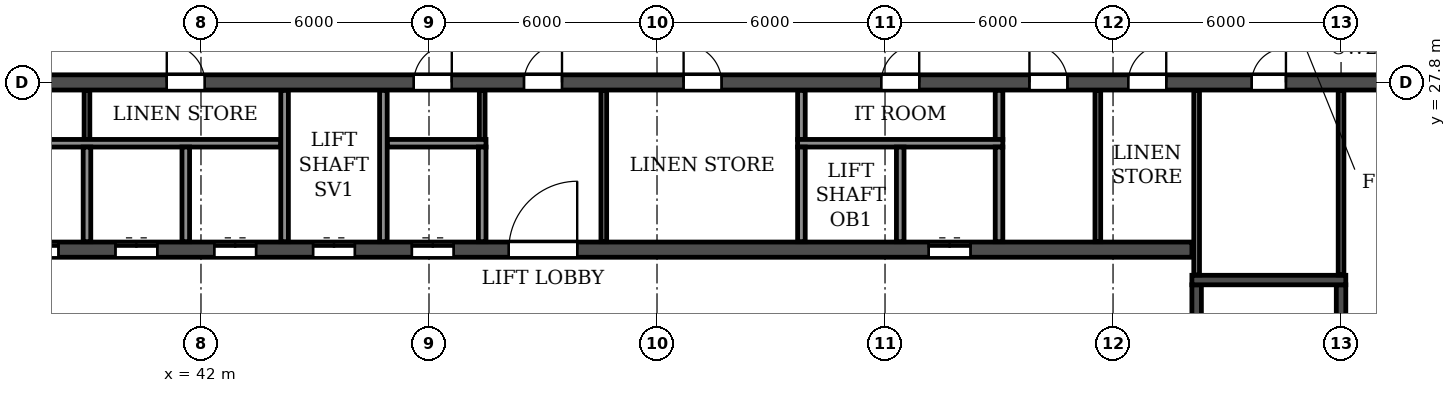
"""IFC4 building model, lengths in metres.
Left out: names, types, materials, properties, quantities, classifications, styles, units other than length and angle.
Written with IfcOpenShell. Run it as: python <this file> out.ifc"""

import sys

from ifc_helpers import new_model, si_unit, direction, frame, frame_2d, origin, place, context, subcontext, project, spatial, rectangle, extrude, element, fill, save


model = new_model("IFC4")
c1 = context("Model", 3, precision=1e-05, world=origin(), true_north=direction((0.0, 1.0)))
c2 = subcontext(c1, "Body", "Model", "MODEL_VIEW")
j1 = project(units=[si_unit("LENGTHUNIT", "METRE"), si_unit("PLANEANGLEUNIT", "RADIAN")], contexts=[c1])
p1 = place(None, origin())
s1 = spatial("IfcSite", under=j1, at=p1, CompositionType="ELEMENT")
p2 = place(p1, origin())
s2 = spatial("IfcBuilding", under=s1, at=p2, CompositionType="ELEMENT")
p3 = place(p2, frame((0.0, 0.0, 171.9)))
s3 = spatial("IfcBuildingStorey", under=s2, at=p3, CompositionType="ELEMENT", Elevation=171.9)
p4 = place(p3, frame((18.2, 27.8, 0.0), z_axis=(0.0, 0.0, 1.0), x_axis=(1.0, 0.0, 0.0)))
e1 = element("IfcWall", 1, at=p4, inside=s3, PredefinedType="SOLIDWALL", context=c2, shape_type="SweptSolid", body=[
    extrude(rectangle(XDim=65.6, YDim=0.4, at=frame_2d((32.8, 0.0))), origin(), (0.0, 0.0, 1.0), 3.08),
])
p5 = place(p4, frame((0.7, 0.0, 0.0)))
e2 = element("IfcOpeningElement", 2, at=p5, cuts=e1, PredefinedType="OPENING", context=c2, shape_type="SweptSolid", body=[
    extrude(rectangle(XDim=1.0, YDim=2.1, at=frame_2d((0.5, 1.05))), frame((0.0, 0.21, 0.0), z_axis=(0.0, -1.0, 0.0), x_axis=(1.0, 0.0, 0.0)), (0.0, 0.0, 1.0), 0.42),
])
p6 = place(p4, frame((4.05, 0.0, 0.0)))
e3 = element("IfcOpeningElement", 3, at=p6, cuts=e1, PredefinedType="OPENING", context=c2, shape_type="SweptSolid", body=[
    extrude(rectangle(XDim=0.9, YDim=2.1, at=frame_2d((0.45, 1.05))), frame((0.0, 0.21, 0.0), z_axis=(0.0, -1.0, 0.0), x_axis=(1.0, 0.0, 0.0)), (0.0, 0.0, 1.0), 0.42),
])
p7 = place(p4, frame((13.25, 0.0, 0.0)))
e4 = element("IfcOpeningElement", 4, at=p7, cuts=e1, PredefinedType="OPENING", context=c2, shape_type="SweptSolid", body=[
    extrude(rectangle(XDim=0.9, YDim=2.1, at=frame_2d((0.45, 1.05))), frame((0.0, 0.21, 0.0), z_axis=(0.0, -1.0, 0.0), x_axis=(1.0, 0.0, 0.0)), (0.0, 0.0, 1.0), 0.42),
])
p8 = place(p4, frame((17.7, 0.0, 0.0)))
e5 = element("IfcOpeningElement", 5, at=p8, cuts=e1, PredefinedType="OPENING", context=c2, shape_type="SweptSolid", body=[
    extrude(rectangle(XDim=1.0, YDim=2.1, at=frame_2d((0.5, 1.05))), frame((0.0, 0.21, 0.0), z_axis=(0.0, -1.0, 0.0), x_axis=(1.0, 0.0, 0.0)), (0.0, 0.0, 1.0), 0.42),
])
p9 = place(p4, frame((22.9, 0.0, 0.0)))
e6 = element("IfcOpeningElement", 6, at=p9, cuts=e1, PredefinedType="OPENING", context=c2, shape_type="SweptSolid", body=[
    extrude(rectangle(XDim=1.0, YDim=2.1, at=frame_2d((0.5, 1.05))), frame((0.0, 0.21, 0.0), z_axis=(0.0, -1.0, 0.0), x_axis=(1.0, 0.0, 0.0)), (0.0, 0.0, 1.0), 0.42),
])
p10 = place(p4, frame((29.4, 0.0, 0.0)))
e7 = element("IfcOpeningElement", 7, at=p10, cuts=e1, PredefinedType="OPENING", context=c2, shape_type="SweptSolid", body=[
    extrude(rectangle(XDim=1.0, YDim=2.1, at=frame_2d((0.5, 1.05))), frame((0.0, 0.21, 0.0), z_axis=(0.0, -1.0, 0.0), x_axis=(1.0, 0.0, 0.0)), (0.0, 0.0, 1.0), 0.42),
])
p11 = place(p4, frame((32.3, 0.0, 0.0)))
e8 = element("IfcOpeningElement", 8, at=p11, cuts=e1, PredefinedType="OPENING", context=c2, shape_type="SweptSolid", body=[
    extrude(rectangle(XDim=1.0, YDim=2.1, at=frame_2d((0.5, 1.05))), frame((0.0, 0.21, 0.0), z_axis=(0.0, -1.0, 0.0), x_axis=(1.0, 0.0, 0.0)), (0.0, 0.0, 1.0), 0.42),
])
p12 = place(p4, frame((36.5, 0.0, 0.0)))
e9 = element("IfcOpeningElement", 9, at=p12, cuts=e1, PredefinedType="OPENING", context=c2, shape_type="SweptSolid", body=[
    extrude(rectangle(XDim=1.0, YDim=2.1, at=frame_2d((0.5, 1.05))), frame((0.0, 0.21, 0.0), z_axis=(0.0, -1.0, 0.0), x_axis=(1.0, 0.0, 0.0)), (0.0, 0.0, 1.0), 0.42),
])
p13 = place(p4, frame((41.7, 0.0, 0.0)))
e10 = element("IfcOpeningElement", 10, at=p13, cuts=e1, PredefinedType="OPENING", context=c2, shape_type="SweptSolid", body=[
    extrude(rectangle(XDim=1.0, YDim=2.1, at=frame_2d((0.5, 1.05))), frame((0.0, 0.21, 0.0), z_axis=(0.0, -1.0, 0.0), x_axis=(1.0, 0.0, 0.0)), (0.0, 0.0, 1.0), 0.42),
])
p14 = place(p4, frame((45.6, 0.0, 0.0)))
e11 = element("IfcOpeningElement", 11, at=p14, cuts=e1, PredefinedType="OPENING", context=c2, shape_type="SweptSolid", body=[
    extrude(rectangle(XDim=1.0, YDim=2.1, at=frame_2d((0.5, 1.05))), frame((0.0, 0.21, 0.0), z_axis=(0.0, -1.0, 0.0), x_axis=(1.0, 0.0, 0.0)), (0.0, 0.0, 1.0), 0.42),
])
p15 = place(p4, frame((48.2, 0.0, 0.0)))
e12 = element("IfcOpeningElement", 12, at=p15, cuts=e1, PredefinedType="OPENING", context=c2, shape_type="SweptSolid", body=[
    extrude(rectangle(XDim=1.0, YDim=2.1, at=frame_2d((0.5, 1.05))), frame((0.0, 0.21, 0.0), z_axis=(0.0, -1.0, 0.0), x_axis=(1.0, 0.0, 0.0)), (0.0, 0.0, 1.0), 0.42),
])
p16 = place(p4, frame((51.45, 0.0, 0.0)))
e13 = element("IfcOpeningElement", 13, at=p16, cuts=e1, PredefinedType="OPENING", context=c2, shape_type="SweptSolid", body=[
    extrude(rectangle(XDim=0.9, YDim=2.1, at=frame_2d((0.45, 1.05))), frame((0.0, 0.21, 0.0), z_axis=(0.0, -1.0, 0.0), x_axis=(1.0, 0.0, 0.0)), (0.0, 0.0, 1.0), 0.42),
])
p17 = place(p4, frame((60.65, 0.0, 0.0)))
e14 = element("IfcOpeningElement", 14, at=p17, cuts=e1, PredefinedType="OPENING", context=c2, shape_type="SweptSolid", body=[
    extrude(rectangle(XDim=0.9, YDim=2.1, at=frame_2d((0.45, 1.05))), frame((0.0, 0.21, 0.0), z_axis=(0.0, -1.0, 0.0), x_axis=(1.0, 0.0, 0.0)), (0.0, 0.0, 1.0), 0.42),
])
p18 = place(p4, frame((63.9, 0.0, 0.0)))
e15 = element("IfcOpeningElement", 15, at=p18, cuts=e1, PredefinedType="OPENING", context=c2, shape_type="SweptSolid", body=[
    extrude(rectangle(XDim=1.0, YDim=2.1, at=frame_2d((0.5, 1.05))), frame((0.0, 0.21, 0.0), z_axis=(0.0, -1.0, 0.0), x_axis=(1.0, 0.0, 0.0)), (0.0, 0.0, 1.0), 0.42),
])
p19 = place(p3, frame((33.925, 23.4, 0.0), z_axis=(0.0, 0.0, 1.0), x_axis=(1.0, 0.0, 0.0)))
e16 = element("IfcWall", 16, at=p19, inside=s3, PredefinedType="SOLIDWALL", context=c2, shape_type="SweptSolid", body=[
    extrude(rectangle(XDim=34.15, YDim=0.4, at=frame_2d((17.075, 0.0))), origin(), (0.0, 0.0, 1.0), 3.08),
])
p20 = place(p19, frame((16.175, 0.0, 0.0)))
e17 = element("IfcOpeningElement", 17, at=p20, cuts=e16, PredefinedType="OPENING", context=c2, shape_type="SweptSolid", body=[
    extrude(rectangle(XDim=1.8, YDim=2.1, at=frame_2d((0.9, 1.05))), frame((0.0, 0.21, 0.0), z_axis=(0.0, -1.0, 0.0), x_axis=(1.0, 0.0, 0.0)), (0.0, 0.0, 1.0), 0.42),
])
p21 = place(p19, frame((0.625, 0.0, 0.0)))
e18 = element("IfcOpeningElement", 18, at=p21, cuts=e16, PredefinedType="OPENING", context=c2, shape_type="SweptSolid", body=[
    extrude(rectangle(XDim=1.1, YDim=2.1, at=frame_2d((0.55, 1.05))), frame((0.0, 0.21, 0.0), z_axis=(0.0, -1.0, 0.0), x_axis=(1.0, 0.0, 0.0)), (0.0, 0.0, 1.0), 0.42),
])
p22 = place(p19, frame((3.225, 0.0, 0.0)))
e19 = element("IfcOpeningElement", 19, at=p22, cuts=e16, PredefinedType="OPENING", context=c2, shape_type="SweptSolid", body=[
    extrude(rectangle(XDim=1.1, YDim=2.1, at=frame_2d((0.55, 1.05))), frame((0.0, 0.21, 0.0), z_axis=(0.0, -1.0, 0.0), x_axis=(1.0, 0.0, 0.0)), (0.0, 0.0, 1.0), 0.42),
])
p23 = place(p19, frame((5.825, 0.0, 0.0)))
e20 = element("IfcOpeningElement", 20, at=p23, cuts=e16, PredefinedType="OPENING", context=c2, shape_type="SweptSolid", body=[
    extrude(rectangle(XDim=1.1, YDim=2.1, at=frame_2d((0.55, 1.05))), frame((0.0, 0.21, 0.0), z_axis=(0.0, -1.0, 0.0), x_axis=(1.0, 0.0, 0.0)), (0.0, 0.0, 1.0), 0.42),
])
p24 = place(p19, frame((8.425, 0.0, 0.0)))
e21 = element("IfcOpeningElement", 21, at=p24, cuts=e16, PredefinedType="OPENING", context=c2, shape_type="SweptSolid", body=[
    extrude(rectangle(XDim=1.1, YDim=2.1, at=frame_2d((0.55, 1.05))), frame((0.0, 0.21, 0.0), z_axis=(0.0, -1.0, 0.0), x_axis=(1.0, 0.0, 0.0)), (0.0, 0.0, 1.0), 0.42),
])
p25 = place(p19, frame((11.025, 0.0, 0.0)))
e22 = element("IfcOpeningElement", 22, at=p25, cuts=e16, PredefinedType="OPENING", context=c2, shape_type="SweptSolid", body=[
    extrude(rectangle(XDim=1.1, YDim=2.1, at=frame_2d((0.55, 1.05))), frame((0.0, 0.21, 0.0), z_axis=(0.0, -1.0, 0.0), x_axis=(1.0, 0.0, 0.0)), (0.0, 0.0, 1.0), 0.42),
])
p26 = place(p19, frame((13.625, 0.0, 0.0)))
e23 = element("IfcOpeningElement", 23, at=p26, cuts=e16, PredefinedType="OPENING", context=c2, shape_type="SweptSolid", body=[
    extrude(rectangle(XDim=1.1, YDim=2.1, at=frame_2d((0.55, 1.05))), frame((0.0, 0.21, 0.0), z_axis=(0.0, -1.0, 0.0), x_axis=(1.0, 0.0, 0.0)), (0.0, 0.0, 1.0), 0.42),
])
p27 = place(p19, frame((27.225, 0.0, 0.0)))
e24 = element("IfcOpeningElement", 24, at=p27, cuts=e16, PredefinedType="OPENING", context=c2, shape_type="SweptSolid", body=[
    extrude(rectangle(XDim=1.1, YDim=2.1, at=frame_2d((0.55, 1.05))), frame((0.0, 0.21, 0.0), z_axis=(0.0, -1.0, 0.0), x_axis=(1.0, 0.0, 0.0)), (0.0, 0.0, 1.0), 0.42),
])
p28 = place(p3, frame((68.2, 14.8, 0.0), z_axis=(0.0, 0.0, 1.0), x_axis=(0.0, 1.0, 0.0)))
e25 = element("IfcWall", 25, at=p28, inside=s3, PredefinedType="SOLIDWALL", context=c2, shape_type="SweptSolid", body=[
    extrude(rectangle(XDim=7.675, YDim=0.25, at=frame_2d((3.837, 0.0))), origin(), (0.0, 0.0, 1.0), 3.08),
])
p29 = place(p28, frame((0.5, 0.0, 0.0)))
e26 = element("IfcOpeningElement", 26, at=p29, cuts=e25, PredefinedType="OPENING", context=c2, shape_type="SweptSolid", body=[
    extrude(rectangle(XDim=1.0, YDim=2.1, at=frame_2d((0.5, 1.05))), frame((0.0, 0.135, 0.0), z_axis=(0.0, -1.0, 0.0), x_axis=(1.0, 0.0, 0.0)), (0.0, 0.0, 1.0), 0.27),
])
p30 = place(p3, frame((72.0, 14.8, 0.0), z_axis=(0.0, 0.0, 1.0), x_axis=(0.0, 1.0, 0.0)))
e27 = element("IfcWall", 27, at=p30, inside=s3, PredefinedType="SOLIDWALL", context=c2, shape_type="SweptSolid", body=[
    extrude(rectangle(XDim=7.675, YDim=0.25, at=frame_2d((3.837, 0.0))), origin(), (0.0, 0.0, 1.0), 3.08),
])
p31 = place(p3, frame((68.075, 22.6, 0.0), z_axis=(0.0, 0.0, 1.0), x_axis=(1.0, 0.0, 0.0)))
e28 = element("IfcWall", 28, at=p31, inside=s3, PredefinedType="SOLIDWALL", context=c2, shape_type="SweptSolid", body=[
    extrude(rectangle(XDim=4.05, YDim=0.25, at=frame_2d((2.025, 0.0))), origin(), (0.0, 0.0, 1.0), 3.08),
])
p32 = place(p3, frame((49.4, 26.3, 0.0), z_axis=(0.0, 0.0, 1.0), x_axis=(0.0, 1.0, 0.0)))
e29 = element("IfcWall", 29, at=p32, inside=s3, PredefinedType="PARTITIONING", context=c2, shape_type="SweptSolid", body=[
    extrude(rectangle(XDim=1.29, YDim=0.15, at=frame_2d((0.645, 0.0))), origin(), (0.0, 0.0, 1.0), 3.08),
])
p33 = place(p3, frame((52.6, 23.61, 0.0), z_axis=(0.0, 0.0, 1.0), x_axis=(0.0, 1.0, 0.0)))
e30 = element("IfcWall", 30, at=p33, inside=s3, PredefinedType="PARTITIONING", context=c2, shape_type="SweptSolid", body=[
    extrude(rectangle(XDim=3.98, YDim=0.15, at=frame_2d((1.99, 0.0))), origin(), (0.0, 0.0, 1.0), 3.08),
])
p34 = place(p3, frame((39.0, 26.3, 0.0), z_axis=(0.0, 0.0, 1.0), x_axis=(0.0, 1.0, 0.0)))
e31 = element("IfcWall", 31, at=p34, inside=s3, PredefinedType="PARTITIONING", context=c2, shape_type="SweptSolid", body=[
    extrude(rectangle(XDim=1.29, YDim=0.15, at=frame_2d((0.645, 0.0))), origin(), (0.0, 0.0, 1.0), 3.08),
])
p35 = place(p3, frame((65.6, 23.61, 0.0), z_axis=(0.0, 0.0, 1.0), x_axis=(0.0, 1.0, 0.0)))
e32 = element("IfcWall", 32, at=p35, inside=s3, PredefinedType="PARTITIONING", context=c2, shape_type="SweptSolid", body=[
    extrude(rectangle(XDim=3.98, YDim=0.15, at=frame_2d((1.99, 0.0))), origin(), (0.0, 0.0, 1.0), 3.08),
])
for number, where, z_axis, x_axis in (
    (33, (57.8, 26.3, 0.0), (0.0, 0.0, 1.0), (0.0, 1.0, 0.0)),
    (34, (63.0, 26.3, 0.0), (0.0, 0.0, 1.0), (0.0, 1.0, 0.0)),
):
    element("IfcWall", number, at=place(p3, frame(where, z_axis=z_axis, x_axis=x_axis)), inside=s3, PredefinedType="PARTITIONING", context=c2, shape_type="SweptSolid", body=[
        extrude(rectangle(XDim=1.29, YDim=0.2, at=frame_2d((0.645, 0.0))), origin(), (0.0, 0.0, 1.0), 3.08),
    ])
for number, where, z_axis, x_axis in (
    (35, (68.2, 22.735, 0.0), (0.0, 0.0, 1.0), (0.0, 1.0, 0.0)),
    (36, (72.0, 22.735, 0.0), (0.0, 0.0, 1.0), (0.0, 1.0, 0.0)),
):
    element("IfcWall", number, at=place(p3, frame(where, z_axis=z_axis, x_axis=x_axis)), inside=s3, PredefinedType="PARTITIONING", context=c2, shape_type="SweptSolid", body=[
        extrude(rectangle(XDim=4.855, YDim=0.15, at=frame_2d((2.427, 0.0))), origin(), (0.0, 0.0, 1.0), 3.08),
    ])
p36 = place(p3, frame((33.7, 26.2, 0.0), z_axis=(0.0, 0.0, 1.0), x_axis=(1.0, 0.0, 0.0)))
e37 = element("IfcWall", 37, at=p36, inside=s3, PredefinedType="PARTITIONING", context=c2, shape_type="SweptSolid", body=[
    extrude(rectangle(XDim=10.4, YDim=0.2, at=frame_2d((5.2, 0.0))), origin(), (0.0, 0.0, 1.0), 3.08),
])
p37 = place(p3, frame((46.9, 26.2, 0.0), z_axis=(0.0, 0.0, 1.0), x_axis=(1.0, 0.0, 0.0)))
e38 = element("IfcWall", 38, at=p37, inside=s3, PredefinedType="PARTITIONING", context=c2, shape_type="SweptSolid", body=[
    extrude(rectangle(XDim=2.6, YDim=0.2, at=frame_2d((1.3, 0.0))), origin(), (0.0, 0.0, 1.0), 3.08),
])
p38 = place(p3, frame((57.7, 26.2, 0.0), z_axis=(0.0, 0.0, 1.0), x_axis=(1.0, 0.0, 0.0)))
e39 = element("IfcWall", 39, at=p38, inside=s3, PredefinedType="PARTITIONING", context=c2, shape_type="SweptSolid", body=[
    extrude(rectangle(XDim=5.4, YDim=0.2, at=frame_2d((2.7, 0.0))), origin(), (0.0, 0.0, 1.0), 3.08),
])
for number, where, z_axis, x_axis in (
    (40, (39.0, 23.61, 0.0), (0.0, 0.0, 1.0), (0.0, 1.0, 0.0)),
    (41, (41.6, 23.61, 0.0), (0.0, 0.0, 1.0), (0.0, 1.0, 0.0)),
):
    element("IfcWall", number, at=place(p3, frame(where, z_axis=z_axis, x_axis=x_axis)), inside=s3, PredefinedType="PARTITIONING", context=c2, shape_type="SweptSolid", body=[
        extrude(rectangle(XDim=2.49, YDim=0.2, at=frame_2d((1.245, 0.0))), origin(), (0.0, 0.0, 1.0), 3.08),
    ])
for number, where, z_axis, x_axis in (
    (42, (44.2, 23.61, 0.0), (0.0, 0.0, 1.0), (0.0, 1.0, 0.0)),
    (43, (46.8, 23.61, 0.0), (0.0, 0.0, 1.0), (0.0, 1.0, 0.0)),
):
    element("IfcWall", number, at=place(p3, frame(where, z_axis=z_axis, x_axis=x_axis)), inside=s3, PredefinedType="PARTITIONING", context=c2, shape_type="SweptSolid", body=[
        extrude(rectangle(XDim=3.98, YDim=0.2, at=frame_2d((1.99, 0.0))), origin(), (0.0, 0.0, 1.0), 3.08),
    ])
for number, where, z_axis, x_axis in (
    (44, (49.4, 23.61, 0.0), (0.0, 0.0, 1.0), (0.0, 1.0, 0.0)),
    (45, (57.8, 23.61, 0.0), (0.0, 0.0, 1.0), (0.0, 1.0, 0.0)),
    (46, (60.4, 23.61, 0.0), (0.0, 0.0, 1.0), (0.0, 1.0, 0.0)),
    (47, (63.0, 23.61, 0.0), (0.0, 0.0, 1.0), (0.0, 1.0, 0.0)),
):
    element("IfcWall", number, at=place(p3, frame(where, z_axis=z_axis, x_axis=x_axis)), inside=s3, PredefinedType="PARTITIONING", context=c2, shape_type="SweptSolid", body=[
        extrude(rectangle(XDim=2.49, YDim=0.2, at=frame_2d((1.245, 0.0))), origin(), (0.0, 0.0, 1.0), 3.08),
    ])
p39 = place(p9, origin())
e48 = element("IfcDoor", 48, at=p39, inside=s3, OperationType="SINGLE_SWING_LEFT", PredefinedType="DOOR", context=c2, shape_type="SweptSolid", body=[
    extrude(rectangle(XDim=1.0, YDim=2.1, at=frame_2d((0.5, 1.05))), frame((0.0, 0.025, 0.0), z_axis=(0.0, -1.0, 0.0), x_axis=(1.0, 0.0, 0.0)), (0.0, 0.0, 1.0), 0.05),
])
fill(e6, e48)
p40 = place(p10, origin())
e49 = element("IfcDoor", 49, at=p40, inside=s3, OperationType="SINGLE_SWING_RIGHT", PredefinedType="DOOR", context=c2, shape_type="SweptSolid", body=[
    extrude(rectangle(XDim=1.0, YDim=2.1, at=frame_2d((0.5, 1.05))), frame((0.0, 0.025, 0.0), z_axis=(0.0, -1.0, 0.0), x_axis=(1.0, 0.0, 0.0)), (0.0, 0.0, 1.0), 0.05),
])
fill(e7, e49)
p41 = place(p11, origin())
e50 = element("IfcDoor", 50, at=p41, inside=s3, OperationType="SINGLE_SWING_RIGHT", PredefinedType="DOOR", context=c2, shape_type="SweptSolid", body=[
    extrude(rectangle(XDim=1.0, YDim=2.1, at=frame_2d((0.5, 1.05))), frame((0.0, 0.025, 0.0), z_axis=(0.0, -1.0, 0.0), x_axis=(1.0, 0.0, 0.0)), (0.0, 0.0, 1.0), 0.05),
])
fill(e8, e50)
p42 = place(p12, origin())
e51 = element("IfcDoor", 51, at=p42, inside=s3, OperationType="SINGLE_SWING_LEFT", PredefinedType="DOOR", context=c2, shape_type="SweptSolid", body=[
    extrude(rectangle(XDim=1.0, YDim=2.1, at=frame_2d((0.5, 1.05))), frame((0.0, 0.025, 0.0), z_axis=(0.0, -1.0, 0.0), x_axis=(1.0, 0.0, 0.0)), (0.0, 0.0, 1.0), 0.05),
])
fill(e9, e51)
p43 = place(p13, origin())
e52 = element("IfcDoor", 52, at=p43, inside=s3, OperationType="SINGLE_SWING_RIGHT", PredefinedType="DOOR", context=c2, shape_type="SweptSolid", body=[
    extrude(rectangle(XDim=1.0, YDim=2.1, at=frame_2d((0.5, 1.05))), frame((0.0, 0.025, 0.0), z_axis=(0.0, -1.0, 0.0), x_axis=(1.0, 0.0, 0.0)), (0.0, 0.0, 1.0), 0.05),
])
fill(e10, e52)
p44 = place(p14, origin())
e53 = element("IfcDoor", 53, at=p44, inside=s3, OperationType="SINGLE_SWING_LEFT", PredefinedType="DOOR", context=c2, shape_type="SweptSolid", body=[
    extrude(rectangle(XDim=1.0, YDim=2.1, at=frame_2d((0.5, 1.05))), frame((0.0, 0.025, 0.0), z_axis=(0.0, -1.0, 0.0), x_axis=(1.0, 0.0, 0.0)), (0.0, 0.0, 1.0), 0.05),
])
fill(e11, e53)
p45 = place(p15, origin())
e54 = element("IfcDoor", 54, at=p45, inside=s3, OperationType="SINGLE_SWING_RIGHT", PredefinedType="DOOR", context=c2, shape_type="SweptSolid", body=[
    extrude(rectangle(XDim=1.0, YDim=2.1, at=frame_2d((0.5, 1.05))), frame((0.0, 0.025, 0.0), z_axis=(0.0, -1.0, 0.0), x_axis=(1.0, 0.0, 0.0)), (0.0, 0.0, 1.0), 0.05),
])
fill(e12, e54)
p46 = place(p16, origin())
e55 = element("IfcDoor", 55, at=p46, inside=s3, OperationType="SINGLE_SWING_RIGHT", PredefinedType="DOOR", context=c2, shape_type="SweptSolid", body=[
    extrude(rectangle(XDim=0.9, YDim=2.1, at=frame_2d((0.45, 1.05))), frame((0.0, 0.025, 0.0), z_axis=(0.0, -1.0, 0.0), x_axis=(1.0, 0.0, 0.0)), (0.0, 0.0, 1.0), 0.05),
])
fill(e13, e55)
p47 = place(p20, origin())
e56 = element("IfcDoor", 56, at=p47, inside=s3, OperationType="DOUBLE_DOOR_SINGLE_SWING", PredefinedType="DOOR", context=c2, shape_type="SweptSolid", body=[
    extrude(rectangle(XDim=1.8, YDim=2.1, at=frame_2d((0.9, 1.05))), frame((0.0, 0.025, 0.0), z_axis=(0.0, -1.0, 0.0), x_axis=(1.0, 0.0, 0.0)), (0.0, 0.0, 1.0), 0.05),
])
fill(e17, e56)
p48 = place(p22, origin())
e57 = element("IfcDoor", 57, at=p48, inside=s3, OperationType="DOUBLE_DOOR_SLIDING", PredefinedType="DOOR", context=c2, shape_type="SweptSolid", body=[
    extrude(rectangle(XDim=1.1, YDim=2.1, at=frame_2d((0.55, 1.05))), frame((0.0, 0.025, 0.0), z_axis=(0.0, -1.0, 0.0), x_axis=(1.0, 0.0, 0.0)), (0.0, 0.0, 1.0), 0.05),
])
fill(e19, e57)
p49 = place(p23, origin())
e58 = element("IfcDoor", 58, at=p49, inside=s3, OperationType="DOUBLE_DOOR_SLIDING", PredefinedType="DOOR", context=c2, shape_type="SweptSolid", body=[
    extrude(rectangle(XDim=1.1, YDim=2.1, at=frame_2d((0.55, 1.05))), frame((0.0, 0.025, 0.0), z_axis=(0.0, -1.0, 0.0), x_axis=(1.0, 0.0, 0.0)), (0.0, 0.0, 1.0), 0.05),
])
fill(e20, e58)
p50 = place(p24, origin())
e59 = element("IfcDoor", 59, at=p50, inside=s3, OperationType="DOUBLE_DOOR_SLIDING", PredefinedType="DOOR", context=c2, shape_type="SweptSolid", body=[
    extrude(rectangle(XDim=1.1, YDim=2.1, at=frame_2d((0.55, 1.05))), frame((0.0, 0.025, 0.0), z_axis=(0.0, -1.0, 0.0), x_axis=(1.0, 0.0, 0.0)), (0.0, 0.0, 1.0), 0.05),
])
fill(e21, e59)
p51 = place(p25, origin())
e60 = element("IfcDoor", 60, at=p51, inside=s3, OperationType="DOUBLE_DOOR_SLIDING", PredefinedType="DOOR", context=c2, shape_type="SweptSolid", body=[
    extrude(rectangle(XDim=1.1, YDim=2.1, at=frame_2d((0.55, 1.05))), frame((0.0, 0.025, 0.0), z_axis=(0.0, -1.0, 0.0), x_axis=(1.0, 0.0, 0.0)), (0.0, 0.0, 1.0), 0.05),
])
fill(e22, e60)
p52 = place(p26, origin())
e61 = element("IfcDoor", 61, at=p52, inside=s3, OperationType="DOUBLE_DOOR_SLIDING", PredefinedType="DOOR", context=c2, shape_type="SweptSolid", body=[
    extrude(rectangle(XDim=1.1, YDim=2.1, at=frame_2d((0.55, 1.05))), frame((0.0, 0.025, 0.0), z_axis=(0.0, -1.0, 0.0), x_axis=(1.0, 0.0, 0.0)), (0.0, 0.0, 1.0), 0.05),
])
fill(e23, e61)
p53 = place(p27, origin())
e62 = element("IfcDoor", 62, at=p53, inside=s3, OperationType="DOUBLE_DOOR_SLIDING", PredefinedType="DOOR", context=c2, shape_type="SweptSolid", body=[
    extrude(rectangle(XDim=1.1, YDim=2.1, at=frame_2d((0.55, 1.05))), frame((0.0, 0.025, 0.0), z_axis=(0.0, -1.0, 0.0), x_axis=(1.0, 0.0, 0.0)), (0.0, 0.0, 1.0), 0.05),
])
fill(e24, e62)
save(model, sys.argv[1])
